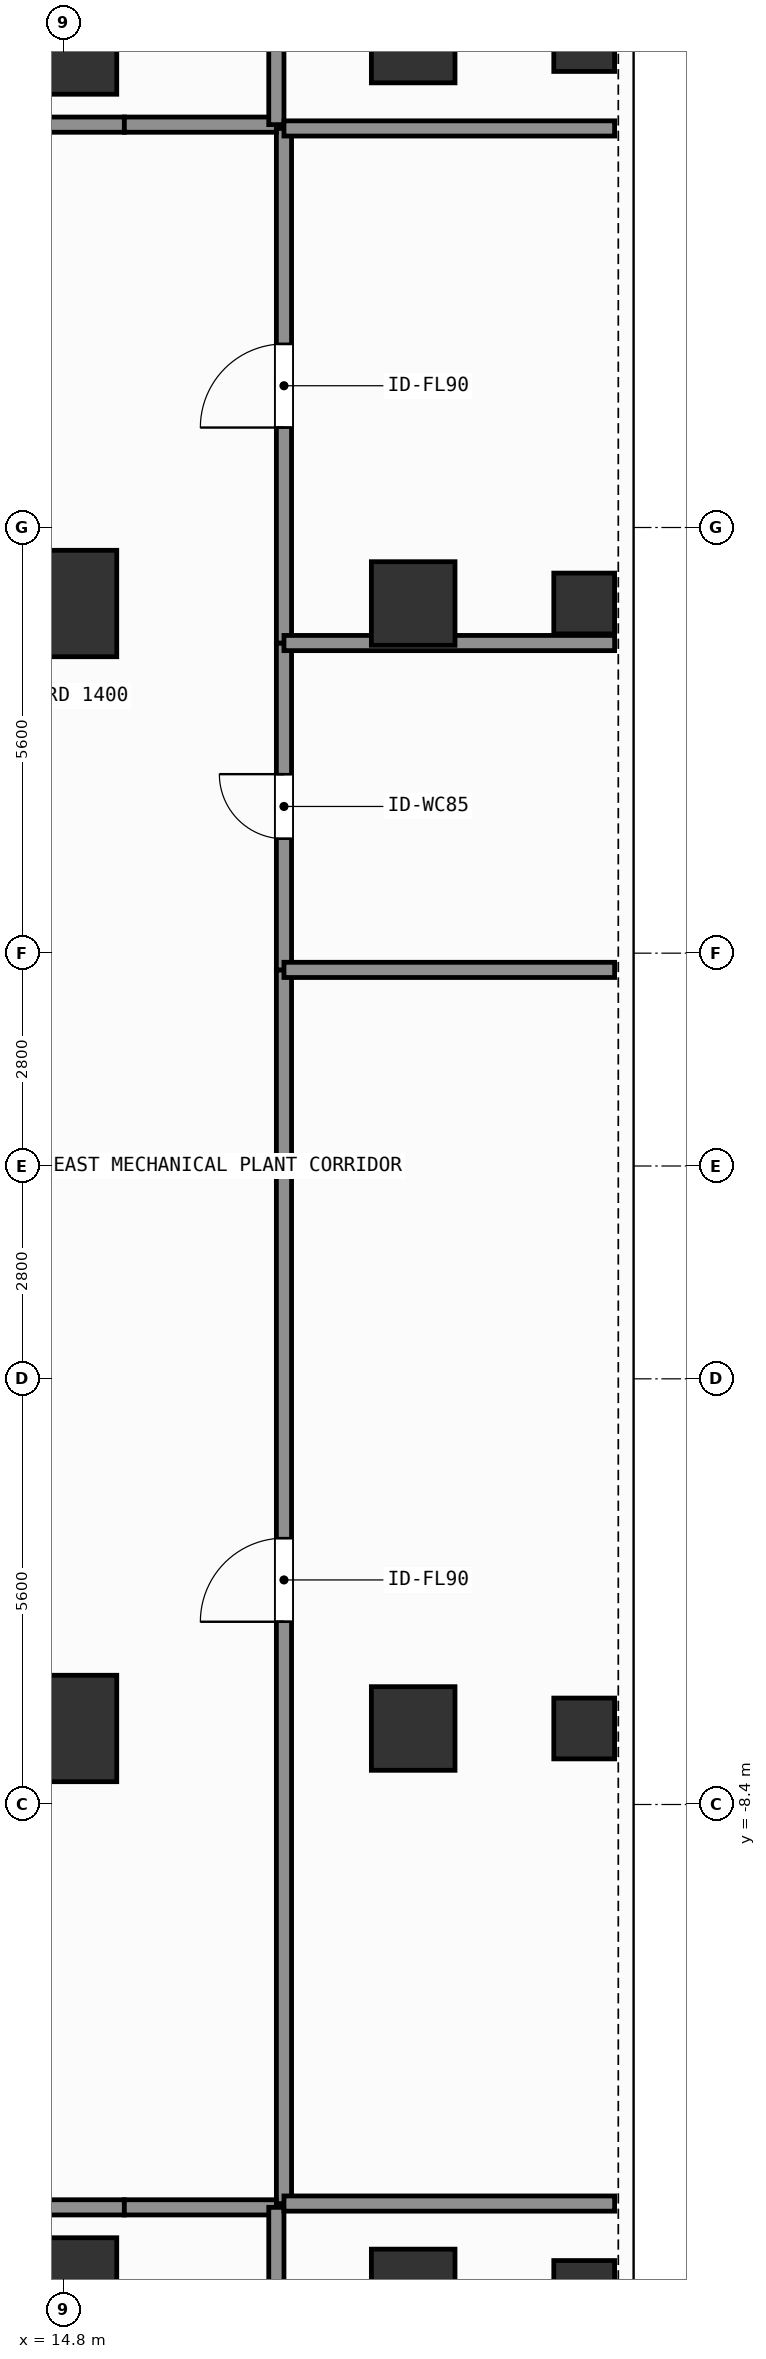
"""IFC4 building model, lengths in metres.
Left out: names, types, materials, properties, quantities, classifications, styles, units other than length and angle.
Written with IfcOpenShell. Run it as: python <this file> out.ifc"""

import sys

from ifc_helpers import new_model, si_unit, direction, frame, frame_2d, origin, origin_2d, place, context, subcontext, project, spatial, rectangle, hollow_rectangle, extrude, element, fill, save


model = new_model("IFC4")
c1 = context("Model", 3, precision=1e-05, world=origin(), true_north=direction((0.0, 1.0)))
c2 = subcontext(c1, "Body", "Model", "MODEL_VIEW")
j1 = project(units=[si_unit("LENGTHUNIT", "METRE"), si_unit("PLANEANGLEUNIT", "RADIAN")], contexts=[c1])
p1 = place(None, origin())
s1 = spatial("IfcSite", under=j1, at=p1, CompositionType="ELEMENT")
p2 = place(p1, origin())
s2 = spatial("IfcBuilding", under=s1, at=p2, CompositionType="ELEMENT")
p3 = place(p2, frame((0.0, 0.0, 77.4)))
s3 = spatial("IfcBuildingStorey", under=s2, at=p3, CompositionType="ELEMENT", Elevation=77.4)
for number, where, z_axis, x_axis in (
    (1, (14.8, -14.8, 0.0), (0.0, 0.0, 1.0), (1.0, 0.0, 0.0)),
    (2, (14.8, 14.8, 0.0), (0.0, 0.0, 1.0), (1.0, 0.0, 0.0)),
    (3, (14.8, -7.4, 0.0), (0.0, 0.0, 1.0), (1.0, 0.0, 0.0)),
    (4, (14.8, 7.4, 0.0), (0.0, 0.0, 1.0), (1.0, 0.0, 0.0)),
):
    element("IfcColumn", number, at=place(p3, frame(where, z_axis=z_axis, x_axis=x_axis)), inside=s3, PredefinedType="COLUMN", context=c2, shape_type="SweptSolid", body=[
        extrude(rectangle(XDim=1.4, YDim=1.4, at=origin_2d()), origin(), (0.0, 0.0, 1.0), 7.8),
    ])
for number, where, z_axis, x_axis in (
    (5, (19.4, -14.8, 0.0), (0.0, 0.0, 1.0), (1.0, 0.0, 0.0)),
    (6, (19.4, -7.4, 0.0), (0.0, 0.0, 1.0), (1.0, 0.0, 0.0)),
    (7, (19.4, 7.4, 0.0), (0.0, 0.0, 1.0), (1.0, 0.0, 0.0)),
    (8, (19.4, 14.8, 0.0), (0.0, 0.0, 1.0), (1.0, 0.0, 0.0)),
):
    element("IfcColumn", number, at=place(p3, frame(where, z_axis=z_axis, x_axis=x_axis)), inside=s3, PredefinedType="COLUMN", context=c2, shape_type="SweptSolid", body=[
        extrude(rectangle(XDim=1.1, YDim=1.1, at=origin_2d()), origin(), (0.0, 0.0, 1.0), 7.8),
    ])
for number, where, z_axis, x_axis in (
    (9, (21.65, -14.8, 0.0), (0.0, 0.0, 1.0), (1.0, 0.0, 0.0)),
    (10, (21.65, -7.4, 0.0), (0.0, 0.0, 1.0), (1.0, 0.0, 0.0)),
    (11, (21.65, 7.4, 0.0), (0.0, 0.0, 1.0), (1.0, 0.0, 0.0)),
    (12, (21.65, 14.8, 0.0), (0.0, 0.0, 1.0), (1.0, 0.0, 0.0)),
):
    element("IfcColumn", number, at=place(p3, frame(where, z_axis=z_axis, x_axis=x_axis)), inside=s3, PredefinedType="COLUMN", context=c2, shape_type="SweptSolid", body=[
        extrude(hollow_rectangle(XDim=0.8, YDim=0.8, WallThickness=0.036, at=origin_2d()), origin(), (0.0, 0.0, 1.0), 7.8),
    ])
p4 = place(p3, frame((-11.55, -13.7, 0.0), z_axis=(0.0, 0.0, 1.0), x_axis=(1.0, 0.0, 0.0)))
e13 = element("IfcWall", 13, at=p4, inside=s3, PredefinedType="SOLIDWALL", context=c2, shape_type="SweptSolid", body=[
    extrude(rectangle(XDim=27.15, YDim=0.2, at=frame_2d((13.575, 0.0))), origin(), (0.0, 0.0, 1.0), 7.52),
])
p5 = place(p4, frame((9.114, 0.0, 0.0)))
e14 = element("IfcOpeningElement", 14, at=p5, cuts=e13, PredefinedType="OPENING", context=c2, shape_type="SweptSolid", body=[
    extrude(rectangle(XDim=1.4, YDim=2.2, at=frame_2d((0.7, 1.1))), frame((0.0, 0.11, 0.0), z_axis=(0.0, -1.0, 0.0), x_axis=(1.0, 0.0, 0.0)), (0.0, 0.0, 1.0), 0.22),
])
p6 = place(p3, frame((-11.55, 13.7, 0.0), z_axis=(0.0, 0.0, 1.0), x_axis=(1.0, 0.0, 0.0)))
e15 = element("IfcWall", 15, at=p6, inside=s3, PredefinedType="SOLIDWALL", context=c2, shape_type="SweptSolid", body=[
    extrude(rectangle(XDim=27.15, YDim=0.2, at=frame_2d((13.575, 0.0))), origin(), (0.0, 0.0, 1.0), 7.52),
])
p7 = place(p6, frame((9.114, 0.0, 0.0)))
e16 = element("IfcOpeningElement", 16, at=p7, cuts=e15, PredefinedType="OPENING", context=c2, shape_type="SweptSolid", body=[
    extrude(rectangle(XDim=1.4, YDim=2.2, at=frame_2d((0.7, 1.1))), frame((0.0, 0.11, 0.0), z_axis=(0.0, -1.0, 0.0), x_axis=(1.0, 0.0, 0.0)), (0.0, 0.0, 1.0), 0.22),
])
p8 = place(p3, frame((17.7, -13.65, 0.0), z_axis=(0.0, 0.0, 1.0), x_axis=(0.0, 1.0, 0.0)))
e17 = element("IfcWall", 17, at=p8, inside=s3, PredefinedType="SOLIDWALL", context=c2, shape_type="SweptSolid", body=[
    extrude(rectangle(XDim=16.23, YDim=0.2, at=frame_2d((8.115, 0.0))), origin(), (0.0, 0.0, 1.0), 7.52),
])
p9 = place(p8, frame((7.654, 0.0, 0.0)))
e18 = element("IfcOpeningElement", 18, at=p9, cuts=e17, PredefinedType="OPENING", context=c2, shape_type="SweptSolid", body=[
    extrude(rectangle(XDim=1.1, YDim=2.15, at=frame_2d((0.55, 1.075))), frame((0.0, 0.11, 0.0), z_axis=(0.0, -1.0, 0.0), x_axis=(1.0, 0.0, 0.0)), (0.0, 0.0, 1.0), 0.22),
])
p10 = place(p3, frame((17.7, 2.58, 0.0), z_axis=(0.0, 0.0, 1.0), x_axis=(0.0, 1.0, 0.0)))
e19 = element("IfcWall", 19, at=p10, inside=s3, PredefinedType="SOLIDWALL", context=c2, shape_type="SweptSolid", body=[
    extrude(rectangle(XDim=4.3, YDim=0.2, at=frame_2d((2.15, 0.0))), origin(), (0.0, 0.0, 1.0), 7.52),
])
p11 = place(p10, frame((1.725, 0.0, 0.0)))
e20 = element("IfcOpeningElement", 20, at=p11, cuts=e19, PredefinedType="OPENING", context=c2, shape_type="SweptSolid", body=[
    extrude(rectangle(XDim=0.85, YDim=2.1, at=frame_2d((0.425, 1.05))), frame((0.0, 0.11, 0.0), z_axis=(0.0, -1.0, 0.0), x_axis=(1.0, 0.0, 0.0)), (0.0, 0.0, 1.0), 0.22),
])
p12 = place(p3, frame((17.7, 6.88, 0.0), z_axis=(0.0, 0.0, 1.0), x_axis=(0.0, 1.0, 0.0)))
e21 = element("IfcWall", 21, at=p12, inside=s3, PredefinedType="SOLIDWALL", context=c2, shape_type="SweptSolid", body=[
    extrude(rectangle(XDim=6.77, YDim=0.2, at=frame_2d((3.385, 0.0))), origin(), (0.0, 0.0, 1.0), 7.52),
])
p13 = place(p12, frame((2.835, 0.0, 0.0)))
e22 = element("IfcOpeningElement", 22, at=p13, cuts=e21, PredefinedType="OPENING", context=c2, shape_type="SweptSolid", body=[
    extrude(rectangle(XDim=1.1, YDim=2.15, at=frame_2d((0.55, 1.075))), frame((0.0, 0.11, 0.0), z_axis=(0.0, -1.0, 0.0), x_axis=(1.0, 0.0, 0.0)), (0.0, 0.0, 1.0), 0.22),
])
for number, where, z_axis, x_axis in (
    (23, (15.6, -13.7, 0.0), (0.0, 0.0, 1.0), (1.0, 0.0, 0.0)),
    (24, (15.6, 13.7, 0.0), (0.0, 0.0, 1.0), (1.0, 0.0, 0.0)),
):
    element("IfcWall", number, at=place(p3, frame(where, z_axis=z_axis, x_axis=x_axis)), inside=s3, PredefinedType="SOLIDWALL", context=c2, shape_type="SweptSolid", body=[
        extrude(rectangle(XDim=2.0, YDim=0.2, at=frame_2d((1.0, 0.0))), origin(), (0.0, 0.0, 1.0), 7.52),
    ])
for number, where, z_axis, x_axis in (
    (25, (17.6, -24.95, 0.0), (0.0, 0.0, 1.0), (0.0, 1.0, 0.0)),
    (26, (17.6, 13.7, 0.0), (0.0, 0.0, 1.0), (0.0, 1.0, 0.0)),
):
    element("IfcWall", number, at=place(p3, frame(where, z_axis=z_axis, x_axis=x_axis)), inside=s3, PredefinedType="SOLIDWALL", context=c2, shape_type="SweptSolid", body=[
        extrude(rectangle(XDim=11.25, YDim=0.2, at=frame_2d((5.625, 0.0))), origin(), (0.0, 0.0, 1.0), 7.52),
    ])
for number, where, z_axis, x_axis in (
    (27, (17.7, -13.65, 0.0), (0.0, 0.0, 1.0), (1.0, 0.0, 0.0)),
    (28, (17.7, 13.65, 0.0), (0.0, 0.0, 1.0), (1.0, 0.0, 0.0)),
    (29, (17.7, 2.58, 0.0), (0.0, 0.0, 1.0), (1.0, 0.0, 0.0)),
    (30, (17.7, 6.88, 0.0), (0.0, 0.0, 1.0), (1.0, 0.0, 0.0)),
):
    element("IfcWall", number, at=place(p3, frame(where, z_axis=z_axis, x_axis=x_axis)), inside=s3, PredefinedType="SOLIDWALL", context=c2, shape_type="SweptSolid", body=[
        extrude(rectangle(XDim=4.35, YDim=0.2, at=frame_2d((2.175, 0.0))), origin(), (0.0, 0.0, 1.0), 7.52),
    ])
p14 = place(p9, origin())
e31 = element("IfcDoor", 31, at=p14, inside=s3, OperationType="SINGLE_SWING_LEFT", PredefinedType="DOOR", context=c2, shape_type="SweptSolid", body=[
    extrude(rectangle(XDim=1.1, YDim=2.15, at=frame_2d((0.55, 1.075))), frame((0.0, 0.025, 0.0), z_axis=(0.0, -1.0, 0.0), x_axis=(1.0, 0.0, 0.0)), (0.0, 0.0, 1.0), 0.05),
])
fill(e18, e31)
p15 = place(p11, origin())
e32 = element("IfcDoor", 32, at=p15, inside=s3, OperationType="SINGLE_SWING_RIGHT", PredefinedType="DOOR", context=c2, shape_type="SweptSolid", body=[
    extrude(rectangle(XDim=0.85, YDim=2.1, at=frame_2d((0.425, 1.05))), frame((0.0, 0.025, 0.0), z_axis=(0.0, -1.0, 0.0), x_axis=(1.0, 0.0, 0.0)), (0.0, 0.0, 1.0), 0.05),
])
fill(e20, e32)
p16 = place(p13, origin())
e33 = element("IfcDoor", 33, at=p16, inside=s3, OperationType="SINGLE_SWING_LEFT", PredefinedType="DOOR", context=c2, shape_type="SweptSolid", body=[
    extrude(rectangle(XDim=1.1, YDim=2.15, at=frame_2d((0.55, 1.075))), frame((0.0, 0.025, 0.0), z_axis=(0.0, -1.0, 0.0), x_axis=(1.0, 0.0, 0.0)), (0.0, 0.0, 1.0), 0.05),
])
fill(e22, e33)
save(model, sys.argv[1])
